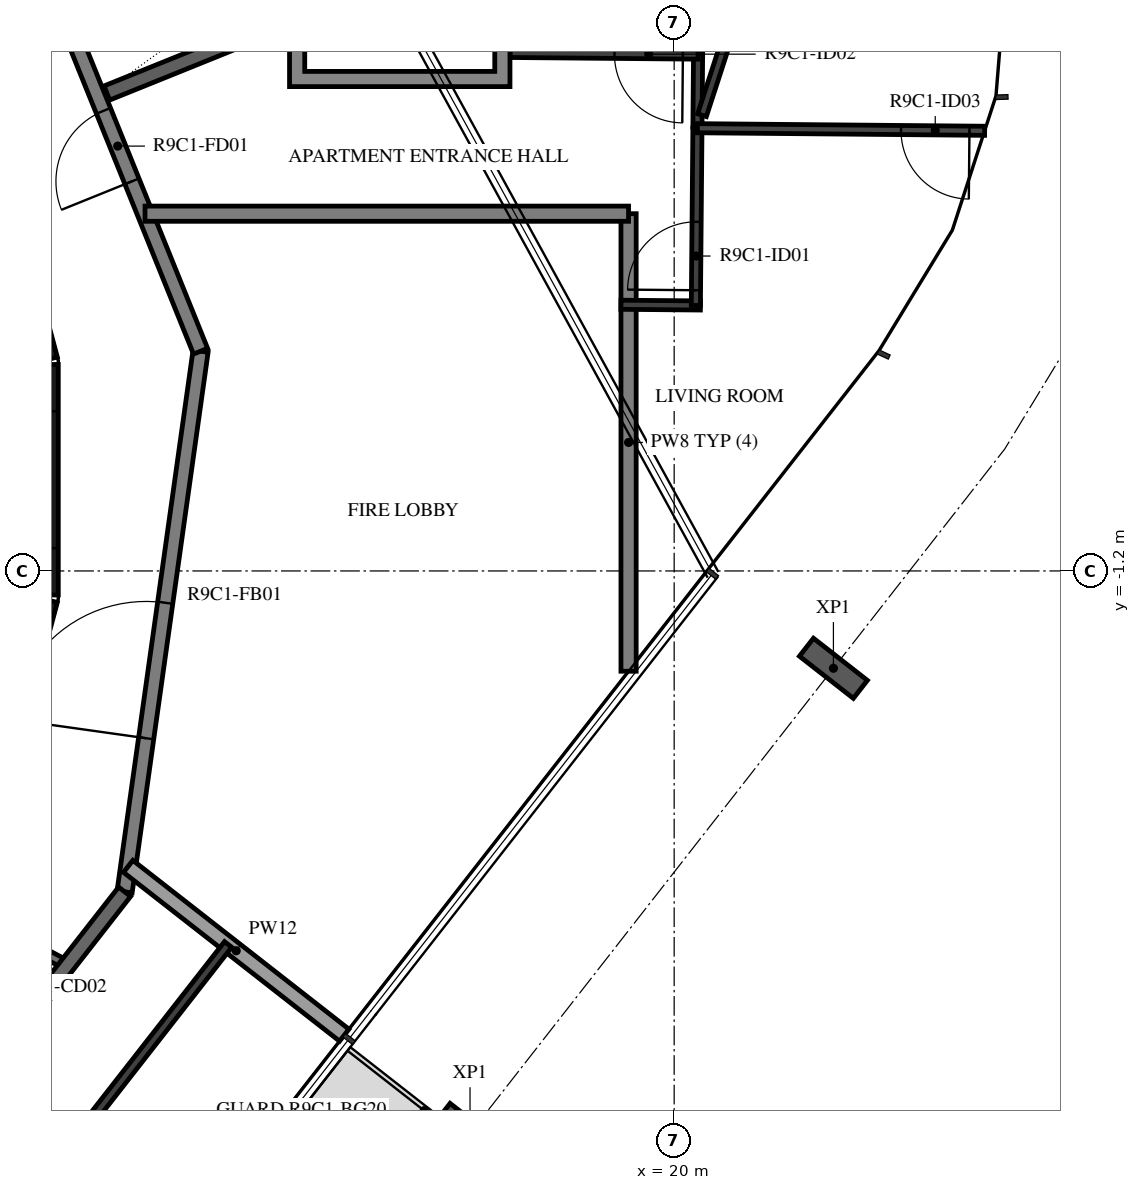
"""IFC4 building model, lengths in metres.
Left out: names, types, materials, properties, quantities, classifications, styles, units other than length and angle.
Written with IfcOpenShell. Run it as: python <this file> out.ifc"""

import sys

from ifc_helpers import new_model, si_unit, direction, frame, frame_2d, origin, origin_2d, place, context, subcontext, project, spatial, polyline, rectangle, i_section, outline, extrude, element, fill, save


model = new_model("IFC4")
c1 = context("Model", 3, precision=1e-05, world=origin(), true_north=direction((0.0, 1.0)))
c2 = subcontext(c1, "Body", "Model", "MODEL_VIEW")
j1 = project(units=[si_unit("LENGTHUNIT", "METRE"), si_unit("PLANEANGLEUNIT", "RADIAN")], contexts=[c1])
p1 = place(None, origin())
s1 = spatial("IfcSite", under=j1, at=p1, CompositionType="ELEMENT")
p2 = place(p1, origin())
s2 = spatial("IfcBuilding", under=s1, at=p2, CompositionType="ELEMENT")
p3 = place(p2, frame((0.0, 0.0, 357.5)))
s3 = spatial("IfcBuildingStorey", under=s2, at=p3, CompositionType="ELEMENT", Elevation=357.5)
for number, where, z_axis, x_axis in (
    (1, (17.314, -8.6, -0.38), (0.0, 0.0, 1.0), (-0.616, -0.788, 0.0)),
    (2, (22.095, -2.481, -0.38), (0.0, 0.0, 1.0), (-0.616, -0.788, 0.0)),
):
    element("IfcColumn", number, at=place(p3, frame(where, z_axis=z_axis, x_axis=x_axis)), inside=s3, PredefinedType="COLUMN", context=c2, shape_type="SweptSolid", body=[
        extrude(i_section(OverallWidth=0.3, OverallDepth=0.9, WebThickness=0.019, FlangeThickness=0.035, FilletRadius=0.03, at=origin_2d()), origin(), (0.0, 0.0, 1.0), 3.5),
    ])
p4 = place(p3, frame((10.858, -4.479, 0.0), z_axis=(0.0, 0.0, 1.0), x_axis=(0.258734743916, 0.965948410781, 0.0)))
e3 = element("IfcWall", 3, at=p4, inside=s3, PredefinedType="SHEAR", context=c2, shape_type="SweptSolid", body=[
    extrude(rectangle(XDim=3.033, YDim=0.5, at=frame_2d((1.516, 0.0))), origin(), (0.0, 0.0, 1.0), 3.12),
])
p5 = place(p3, frame((11.647, -1.516, 0.0), z_axis=(0.0, 0.0, 1.0), x_axis=(0.0, 1.0, 0.0)))
e4 = element("IfcWall", 4, at=p5, inside=s3, PredefinedType="SHEAR", context=c2, shape_type="SweptSolid", body=[
    extrude(rectangle(XDim=3.033, YDim=0.5, at=frame_2d((1.516, 0.0))), origin(), (0.0, 0.0, 1.0), 3.12),
])
p6 = place(p5, frame((0.616, 0.0, 0.0)))
e5 = element("IfcOpeningElement", 5, at=p6, cuts=e4, PredefinedType="OPENING", context=c2, shape_type="SweptSolid", body=[
    extrude(rectangle(XDim=1.8, YDim=2.1, at=frame_2d((0.9, 1.05))), frame((0.0, 0.26, 0.0), z_axis=(0.0, -1.0, 0.0), x_axis=(1.0, 0.0, 0.0)), (0.0, 0.0, 1.0), 0.52),
])
p7 = place(p3, frame((11.643, 1.55, 0.0), z_axis=(0.0, 0.0, 1.0), x_axis=(-0.258734743916, 0.965948410781, 0.0)))
e6 = element("IfcWall", 6, at=p7, inside=s3, PredefinedType="SHEAR", context=c2, shape_type="SweptSolid", body=[
    extrude(rectangle(XDim=3.033, YDim=0.5, at=frame_2d((1.516, 0.0))), origin(), (0.0, 0.0, 1.0), 3.12),
])
p8 = place(p3, frame((10.511, -5.589, 0.0), z_axis=(0.0, 0.0, 1.0), x_axis=(0.882959677414, -0.469448834337, 0.0)))
e7 = element("IfcWall", 7, at=p8, inside=s3, PredefinedType="PARTITIONING", context=c2, shape_type="SweptSolid", body=[
    extrude(rectangle(XDim=1.702, YDim=0.12, at=frame_2d((0.851, 0.0))), origin(), (0.0, 0.0, 1.0), 3.12),
])
p9 = place(p8, frame((0.1, 0.0, 0.0)))
e8 = element("IfcOpeningElement", 8, at=p9, cuts=e7, PredefinedType="OPENING", context=c2, shape_type="SweptSolid", body=[
    extrude(rectangle(XDim=1.2, YDim=2.1, at=frame_2d((0.6, 1.05))), frame((0.0, 0.07, 0.0), z_axis=(0.0, -1.0, 0.0), x_axis=(1.0, 0.0, 0.0)), (0.0, 0.0, 1.0), 0.14),
])
p10 = place(p3, frame((12.77, -5.42, 0.0), z_axis=(0.0, 0.0, 1.0), x_axis=(0.139155334385, 0.990270565508, 0.0)))
e9 = element("IfcWall", 9, at=p10, inside=s3, PredefinedType="STANDARD", context=c2, shape_type="SweptSolid", body=[
    extrude(rectangle(XDim=7.181, YDim=0.2, at=frame_2d((3.59, 0.0))), origin(), (0.0, 0.0, 1.0), 3.12),
])
p11 = place(p10, frame((2.039, 0.0, 0.0)))
e10 = element("IfcOpeningElement", 10, at=p11, cuts=e9, PredefinedType="OPENING", context=c2, shape_type="SweptSolid", body=[
    extrude(rectangle(XDim=1.8, YDim=2.1, at=frame_2d((0.9, 1.05))), frame((0.0, 0.11, 0.0), z_axis=(0.0, -1.0, 0.0), x_axis=(1.0, 0.0, 0.0)), (0.0, 0.0, 1.0), 0.22),
])
p12 = place(p3, frame((13.769, 1.691, 0.0), z_axis=(0.0, 0.0, 1.0), x_axis=(-0.374618189599, 0.92717916932, 0.0)))
e11 = element("IfcWall", 11, at=p12, inside=s3, PredefinedType="STANDARD", context=c2, shape_type="SweptSolid", body=[
    extrude(rectangle(XDim=7.181, YDim=0.2, at=frame_2d((3.591, 0.0))), origin(), (0.0, 0.0, 1.0), 3.12),
])
p13 = place(p12, frame((2.41, 0.0, 0.0)))
e12 = element("IfcOpeningElement", 12, at=p13, cuts=e11, PredefinedType="OPENING", context=c2, shape_type="SweptSolid", body=[
    extrude(rectangle(XDim=1.0, YDim=2.1, at=frame_2d((0.5, 1.05))), frame((0.0, 0.11, 0.0), z_axis=(0.0, -1.0, 0.0), x_axis=(1.0, 0.0, 0.0)), (0.0, 0.0, 1.0), 0.22),
])
p14 = place(p3, frame((8.349, -11.079, 0.0), z_axis=(0.0, 0.0, 1.0), x_axis=(0.615669112324, 0.78800478687, 0.0)))
e13 = element("IfcWall", 13, at=p14, inside=s3, PredefinedType="STANDARD", context=c2, shape_type="SweptSolid", body=[
    extrude(rectangle(XDim=7.181, YDim=0.2, at=frame_2d((3.591, 0.0))), origin(), (0.0, 0.0, 1.0), 3.12),
])
p15 = place(p3, frame((19.4, -2.519, 0.0), z_axis=(0.0, 0.0, 1.0), x_axis=(0.0, 1.0, 0.0)))
e14 = element("IfcWall", 14, at=p15, inside=s3, PredefinedType="STANDARD", context=c2, shape_type="SweptSolid", body=[
    extrude(rectangle(XDim=6.019, YDim=0.2, at=frame_2d((3.01, 0.0))), origin(), (0.0, 0.0, 1.0), 3.12),
])
p16 = place(p3, frame((19.4, 3.5, 0.0), z_axis=(0.0, 0.0, 1.0), x_axis=(-1.0, 0.0, 0.0)))
e15 = element("IfcWall", 15, at=p16, inside=s3, PredefinedType="STANDARD", context=c2, shape_type="SweptSolid", body=[
    extrude(rectangle(XDim=6.362, YDim=0.2, at=frame_2d((3.181, 0.0))), origin(), (0.0, 0.0, 1.0), 3.12),
])
p17 = place(p3, frame((12.817, -5.086, 0.0), z_axis=(0.0, 0.0, 1.0), x_axis=(0.787994616725, -0.615682129034, 0.0)))
e16 = element("IfcWall", 16, at=p17, inside=s3, PredefinedType="STANDARD", context=c2, shape_type="SweptSolid", body=[
    extrude(rectangle(XDim=3.607, YDim=0.2, at=frame_2d((1.804, 0.0))), origin(), (0.0, 0.0, 1.0), 2.73),
])
p18 = place(p3, frame((14.934, 6.056, 0.0), z_axis=(0.0, 0.0, 1.0), x_axis=(-0.927181938396, -0.374611336071, 0.0)))
e17 = element("IfcWall", 17, at=p18, inside=s3, PredefinedType="STANDARD", context=c2, shape_type="SweptSolid", body=[
    extrude(rectangle(XDim=2.586, YDim=0.2, at=frame_2d((1.293, 0.0))), origin(), (0.0, 0.0, 1.0), 3.12),
])
p19 = place(p3, frame((19.3, 2.302, 0.0), z_axis=(0.0, 0.0, 1.0), x_axis=(0.999958506341, -0.009109643015, 0.0)))
e18 = element("IfcWall", 18, at=p19, inside=s3, PredefinedType="PARTITIONING", context=c2, shape_type="SweptSolid", body=[
    extrude(rectangle(XDim=1.045, YDim=0.12, at=frame_2d((0.522, 0.0))), origin(), (0.0, 0.0, 1.0), 3.12),
])
p20 = place(p3, frame((20.285, 2.293, 0.0), z_axis=(0.0, 0.0, 1.0), x_axis=(0.008900171034, 0.999960392693, 0.0)))
e19 = element("IfcWall", 19, at=p20, inside=s3, PredefinedType="PARTITIONING", context=c2, shape_type="SweptSolid", body=[
    extrude(rectangle(XDim=2.332, YDim=0.12, at=frame_2d((1.166, 0.0))), origin(), (0.0, 0.0, 1.0), 3.12),
])
p21 = place(p20, frame((0.2, 0.0, 0.0)))
e20 = element("IfcOpeningElement", 20, at=p21, cuts=e19, PredefinedType="OPENING", context=c2, shape_type="SweptSolid", body=[
    extrude(rectangle(XDim=0.9, YDim=2.1, at=frame_2d((0.45, 1.05))), frame((0.0, 0.07, 0.0), z_axis=(0.0, -1.0, 0.0), x_axis=(1.0, 0.0, 0.0)), (0.0, 0.0, 1.0), 0.14),
])
p22 = place(p3, frame((20.306, 4.639, 0.0), z_axis=(0.0, 0.0, 1.0), x_axis=(0.008906724211, 0.999960334345, 0.0)))
e21 = element("IfcWall", 21, at=p22, inside=s3, PredefinedType="PARTITIONING", context=c2, shape_type="SweptSolid", body=[
    extrude(rectangle(XDim=1.014, YDim=0.12, at=frame_2d((0.507, 0.0))), origin(), (0.0, 0.0, 1.0), 3.12),
])
p23 = place(p3, frame((20.315, 5.593, 0.0), z_axis=(0.0, 0.0, 1.0), x_axis=(-0.999960597409, 0.008877140833, 0.0)))
e22 = element("IfcWall", 22, at=p23, inside=s3, PredefinedType="PARTITIONING", context=c2, shape_type="SweptSolid", body=[
    extrude(rectangle(XDim=2.475, YDim=0.12, at=frame_2d((1.238, 0.0))), origin(), (0.0, 0.0, 1.0), 3.12),
])
p24 = place(p23, frame((0.2, 0.0, 0.0)))
e23 = element("IfcOpeningElement", 23, at=p24, cuts=e22, PredefinedType="OPENING", context=c2, shape_type="SweptSolid", body=[
    extrude(rectangle(XDim=0.9, YDim=2.1, at=frame_2d((0.45, 1.05))), frame((0.0, 0.07, 0.0), z_axis=(0.0, -1.0, 0.0), x_axis=(1.0, 0.0, 0.0)), (0.0, 0.0, 1.0), 0.14),
])
p25 = place(p3, frame((24.085, 4.591, 0.0), z_axis=(0.0, 0.0, 1.0), x_axis=(-0.99996025077, 0.008916102255, 0.0)))
e24 = element("IfcWall", 24, at=p25, inside=s3, PredefinedType="PARTITIONING", context=c2, shape_type="SweptSolid", body=[
    extrude(rectangle(XDim=3.779, YDim=0.12, at=frame_2d((1.889, 0.0))), origin(), (0.0, 0.0, 1.0), 2.73),
])
p26 = place(p25, frame((0.2, 0.0, 0.0)))
e25 = element("IfcOpeningElement", 25, at=p26, cuts=e24, PredefinedType="OPENING", context=c2, shape_type="SweptSolid", body=[
    extrude(rectangle(XDim=0.9, YDim=2.1, at=frame_2d((0.45, 1.05))), frame((0.0, 0.07, 0.0), z_axis=(0.0, -1.0, 0.0), x_axis=(1.0, 0.0, 0.0)), (0.0, 0.0, 1.0), 0.14),
])
p27 = place(p3, frame((20.68, 5.762, 0.0), z_axis=(0.0, 0.0, 1.0), x_axis=(-0.30908063779, -0.951035834942, 0.0)))
e26 = element("IfcWall", 26, at=p27, inside=s3, PredefinedType="PARTITIONING", context=c2, shape_type="SweptSolid", body=[
    extrude(rectangle(XDim=1.016, YDim=0.12, at=frame_2d((0.508, 0.0))), origin(), (0.0, 0.0, 1.0), 3.12),
])
p28 = place(p3, frame((9.283, -12.319, 0.0), z_axis=(0.0, 0.0, 1.0), x_axis=(0.615666903036, 0.788006512985, 0.0)))
e27 = element("IfcWall", 27, at=p28, inside=s3, PredefinedType="PARTITIONING", context=c2, shape_type="SweptSolid", body=[
    extrude(rectangle(XDim=7.875, YDim=0.12, at=frame_2d((3.938, 0.0))), origin(), (0.0, 0.0, 1.0), 3.12),
])
p29 = place(p3, origin())
e28 = element("IfcWall", 28, at=p29, inside=s3, PredefinedType="STANDARD", context=c2, shape_type="SweptSolid", body=[
    extrude(outline(polyline([(17.84, 8.072), (17.84, 5.172), (14.94, 5.172), (14.94, 8.072), (17.84, 8.072)]), holes=[polyline([(15.14, 5.372), (17.64, 5.372), (17.64, 7.872), (15.14, 7.872), (15.14, 5.372)])]), origin(), (0.0, 0.0, 1.0), 3.12),
])
p30 = place(p13, origin())
e29 = element("IfcDoor", 29, at=p30, inside=s3, OperationType="SINGLE_SWING_LEFT", PredefinedType="DOOR", context=c2, shape_type="SweptSolid", body=[
    extrude(rectangle(XDim=1.0, YDim=2.1, at=frame_2d((0.5, 1.05))), frame((0.0, 0.025, 0.0), z_axis=(0.0, -1.0, 0.0), x_axis=(1.0, 0.0, 0.0)), (0.0, 0.0, 1.0), 0.05),
])
fill(e12, e29)
p31 = place(p21, origin())
e30 = element("IfcDoor", 30, at=p31, inside=s3, OperationType="SINGLE_SWING_RIGHT", PredefinedType="DOOR", context=c2, shape_type="SweptSolid", body=[
    extrude(rectangle(XDim=0.9, YDim=2.1, at=frame_2d((0.45, 1.05))), frame((0.0, 0.025, 0.0), z_axis=(0.0, -1.0, 0.0), x_axis=(1.0, 0.0, 0.0)), (0.0, 0.0, 1.0), 0.05),
])
fill(e20, e30)
p32 = place(p24, origin())
e31 = element("IfcDoor", 31, at=p32, inside=s3, OperationType="SINGLE_SWING_RIGHT", PredefinedType="DOOR", context=c2, shape_type="SweptSolid", body=[
    extrude(rectangle(XDim=0.9, YDim=2.1, at=frame_2d((0.45, 1.05))), frame((0.0, 0.025, 0.0), z_axis=(0.0, -1.0, 0.0), x_axis=(1.0, 0.0, 0.0)), (0.0, 0.0, 1.0), 0.05),
])
fill(e23, e31)
p33 = place(p26, origin())
e32 = element("IfcDoor", 32, at=p33, inside=s3, OperationType="SINGLE_SWING_RIGHT", PredefinedType="DOOR", context=c2, shape_type="SweptSolid", body=[
    extrude(rectangle(XDim=0.9, YDim=2.1, at=frame_2d((0.45, 1.05))), frame((0.0, 0.025, 0.0), z_axis=(0.0, -1.0, 0.0), x_axis=(1.0, 0.0, 0.0)), (0.0, 0.0, 1.0), 0.05),
])
fill(e25, e32)
p34 = place(p11, origin())
e33 = element("IfcDoor", 33, at=p34, inside=s3, OperationType="DOUBLE_DOOR_SINGLE_SWING", PredefinedType="DOOR", context=c2, shape_type="SweptSolid", body=[
    extrude(rectangle(XDim=1.8, YDim=2.1, at=frame_2d((0.9, 1.05))), frame((0.0, 0.025, 0.0), z_axis=(0.0, -1.0, 0.0), x_axis=(1.0, 0.0, 0.0)), (0.0, 0.0, 1.0), 0.05),
])
fill(e10, e33)
save(model, sys.argv[1])
